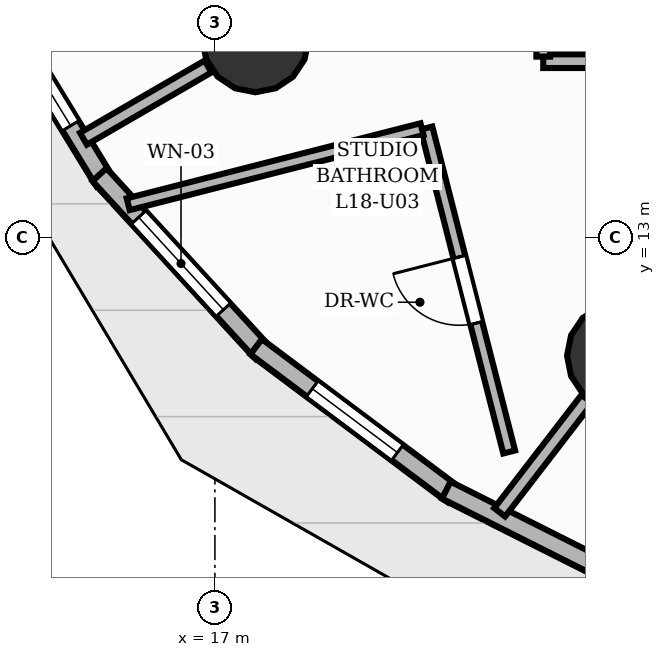
"""IFC4 building model, lengths in metres.
Left out: names, types, materials, properties, quantities, classifications, styles, units other than length and angle.
Written with IfcOpenShell. Run it as: python <this file> out.ifc"""

import sys

from ifc_helpers import new_model, si_unit, direction, frame, frame_2d, origin, origin_2d, place, context, subcontext, project, spatial, rectangle, circle, extrude, element, fill, save


model = new_model("IFC4")
c1 = context("Model", 3, precision=1e-05, world=origin(), true_north=direction((0.0, 1.0)))
c2 = subcontext(c1, "Body", "Model", "MODEL_VIEW")
j1 = project(units=[si_unit("LENGTHUNIT", "METRE"), si_unit("PLANEANGLEUNIT", "RADIAN")], contexts=[c1])
p1 = place(None, origin())
s1 = spatial("IfcSite", under=j1, at=p1, CompositionType="ELEMENT")
p2 = place(p1, origin())
s2 = spatial("IfcBuilding", under=s1, at=p2, CompositionType="ELEMENT")
p3 = place(p2, frame((0.0, 0.0, 63.2)))
s3 = spatial("IfcBuildingStorey", under=s2, at=p3, CompositionType="ELEMENT", Elevation=63.2)
for number, where, z_axis, x_axis in (
    (1, (17.532, 15.611, 0.0), (0.0, 0.0, 1.0), (1.0, 0.0, 0.0)),
    (2, (22.333, 11.445, 0.0), (0.0, 0.0, 1.0), (1.0, 0.0, 0.0)),
):
    element("IfcColumn", number, at=place(p3, frame(where, z_axis=z_axis, x_axis=x_axis)), inside=s3, PredefinedType="COLUMN", context=c2, shape_type="SweptSolid", body=[
        extrude(circle(Radius=0.7, at=origin_2d()), origin(), (0.0, 0.0, 1.0), 3.2),
    ])
p4 = place(p3, frame((15.55, 13.737, 0.0), z_axis=(0.0, 0.0, 1.0), x_axis=(-0.521370891217, 0.853330178648, 0.0)))
e3 = element("IfcWall", 3, at=p4, inside=s3, PredefinedType="SOLIDWALL", context=c2, shape_type="SweptSolid", body=[
    extrude(rectangle(XDim=3.121, YDim=0.25, at=frame_2d((1.56, 0.0))), origin(), (0.0, 0.0, 1.0), 2.8),
])
p5 = place(p4, frame((0.86, 0.0, 0.7)))
e4 = element("IfcOpeningElement", 4, at=p5, cuts=e3, PredefinedType="OPENING", context=c2, shape_type="SweptSolid", body=[
    extrude(rectangle(XDim=1.4, YDim=1.28, at=frame_2d((0.7, 0.64))), frame((0.0, 0.135, 0.0), z_axis=(0.0, -1.0, 0.0), x_axis=(1.0, 0.0, 0.0)), (0.0, 0.0, 1.0), 0.27),
])
p6 = place(p3, frame((17.626, 11.488, 0.0), z_axis=(0.0, 0.0, 1.0), x_axis=(-0.675710696367, 0.737166911096, 0.0)))
e5 = element("IfcWall", 5, at=p6, inside=s3, PredefinedType="SOLIDWALL", context=c2, shape_type="SweptSolid", body=[
    extrude(rectangle(XDim=3.174, YDim=0.25, at=frame_2d((1.587, 0.0))), origin(), (0.0, 0.0, 1.0), 2.8),
])
p7 = place(p6, frame((0.762, 0.0, 0.85)))
e6 = element("IfcOpeningElement", 6, at=p7, cuts=e5, PredefinedType="OPENING", context=c2, shape_type="SweptSolid", body=[
    extrude(rectangle(XDim=1.65, YDim=1.55, at=frame_2d((0.825, 0.775))), frame((0.0, 0.135, 0.0), z_axis=(0.0, -1.0, 0.0), x_axis=(1.0, 0.0, 0.0)), (0.0, 0.0, 1.0), 0.27),
])
p8 = place(p3, frame((20.139, 9.617, 0.0), z_axis=(0.0, 0.0, 1.0), x_axis=(-0.800198613696, 0.599735090385, 0.0)))
e7 = element("IfcWall", 7, at=p8, inside=s3, PredefinedType="SOLIDWALL", context=c2, shape_type="SweptSolid", body=[
    extrude(rectangle(XDim=3.244, YDim=0.25, at=frame_2d((1.622, 0.0))), origin(), (0.0, 0.0, 1.0), 2.8),
])
p9 = place(p8, frame((0.922, 0.0, 0.85)))
e8 = element("IfcOpeningElement", 8, at=p9, cuts=e7, PredefinedType="OPENING", context=c2, shape_type="SweptSolid", body=[
    extrude(rectangle(XDim=1.4, YDim=1.55, at=frame_2d((0.7, 0.775))), frame((0.0, 0.135, 0.0), z_axis=(0.0, -1.0, 0.0), x_axis=(1.0, 0.0, 0.0)), (0.0, 0.0, 1.0), 0.27),
])
p10 = place(p3, frame((23.012, 8.183, 0.0), z_axis=(0.0, 0.0, 1.0), x_axis=(-0.893351919744, 0.449357705498, 0.0)))
e9 = element("IfcWall", 9, at=p10, inside=s3, PredefinedType="SOLIDWALL", context=c2, shape_type="SweptSolid", body=[
    extrude(rectangle(XDim=3.323, YDim=0.25, at=frame_2d((1.662, 0.0))), origin(), (0.0, 0.0, 1.0), 2.8),
])
p11 = place(p3, frame((16.909, 15.25, 0.0), z_axis=(0.0, 0.0, 1.0), x_axis=(-0.865028951922, -0.501721947234, 0.0)))
e10 = element("IfcWall", 10, at=p11, inside=s3, PredefinedType="PARTITIONING", context=c2, shape_type="SweptSolid", body=[
    extrude(rectangle(XDim=1.894, YDim=0.18, at=frame_2d((0.947, 0.0))), origin(), (0.0, 0.0, 1.0), 2.018),
])
p12 = place(p3, frame((21.894, 10.874, 0.0), z_axis=(0.0, 0.0, 1.0), x_axis=(-0.610131095296, -0.792300477441, 0.0)))
e11 = element("IfcWall", 11, at=p12, inside=s3, PredefinedType="PARTITIONING", context=c2, shape_type="SweptSolid", body=[
    extrude(rectangle(XDim=1.88, YDim=0.18, at=frame_2d((0.94, 0.0))), origin(), (0.0, 0.0, 1.0), 2.018),
])
p13 = place(p3, frame((42.62, 15.32, 0.0), z_axis=(0.0, 0.0, 1.0), x_axis=(-1.0, 0.0, 0.0)))
e12 = element("IfcWall", 12, at=p13, inside=s3, PredefinedType="PARTITIONING", context=c2, shape_type="SweptSolid", body=[
    extrude(rectangle(XDim=21.3, YDim=0.18, at=frame_2d((10.65, 0.0))), origin(), (0.0, 0.0, 1.0), 2.795),
])
p14 = place(p13, frame((5.79, 0.0, 0.0)))
e13 = element("IfcOpeningElement", 13, at=p14, cuts=e12, PredefinedType="OPENING", context=c2, shape_type="SweptSolid", body=[
    extrude(rectangle(XDim=1.05, YDim=2.15, at=frame_2d((0.525, 1.075))), frame((0.0, 0.1, 0.0), z_axis=(0.0, -1.0, 0.0), x_axis=(1.0, 0.0, 0.0)), (0.0, 0.0, 1.0), 0.2),
])
p15 = place(p3, frame((21.32, 15.38, 0.0), z_axis=(0.0, 0.0, 1.0), x_axis=(0.0, 1.0, 0.0)))
e14 = element("IfcWall", 14, at=p15, inside=s3, PredefinedType="PARTITIONING", context=c2, shape_type="SweptSolid", body=[
    extrude(rectangle(XDim=17.3, YDim=0.18, at=frame_2d((8.65, 0.0))), origin(), (0.0, 0.0, 1.0), 2.795),
])
p16 = place(p15, frame((8.125, 0.0, 0.0)))
e15 = element("IfcOpeningElement", 15, at=p16, cuts=e14, PredefinedType="OPENING", context=c2, shape_type="SweptSolid", body=[
    extrude(rectangle(XDim=1.05, YDim=2.15, at=frame_2d((0.525, 1.075))), frame((0.0, 0.1, 0.0), z_axis=(0.0, -1.0, 0.0), x_axis=(1.0, 0.0, 0.0)), (0.0, 0.0, 1.0), 0.2),
])
p17 = place(p3, frame((20.872, 10.178, 0.0), z_axis=(0.0, 0.0, 1.0), x_axis=(-0.247520702126, 0.96888260487, 0.0)))
e16 = element("IfcWall", 16, at=p17, inside=s3, PredefinedType="PLUMBINGWALL", context=c2, shape_type="SweptSolid", body=[
    extrude(rectangle(XDim=4.399, YDim=0.16, at=frame_2d((2.2, 0.0))), origin(), (0.0, 0.0, 1.0), 2.795),
])
p18 = place(p17, frame((1.75, 0.0, 0.0)))
e17 = element("IfcOpeningElement", 17, at=p18, cuts=e16, PredefinedType="OPENING", context=c2, shape_type="SweptSolid", body=[
    extrude(rectangle(XDim=0.9, YDim=2.1, at=frame_2d((0.45, 1.05))), frame((0.0, 0.09, 0.0), z_axis=(0.0, -1.0, 0.0), x_axis=(1.0, 0.0, 0.0)), (0.0, 0.0, 1.0), 0.18),
])
p19 = place(p3, frame((19.725, 14.425, 0.0), z_axis=(0.0, 0.0, 1.0), x_axis=(-0.968902730544, -0.24744190984, 0.0)))
e18 = element("IfcWall", 18, at=p19, inside=s3, PredefinedType="PLUMBINGWALL", context=c2, shape_type="SweptSolid", body=[
    extrude(rectangle(XDim=3.99, YDim=0.16, at=frame_2d((1.995, 0.0))), origin(), (0.0, 0.0, 1.0), 2.481),
])
p20 = place(p5, origin())
e19 = element("IfcWindow", 19, at=p20, inside=s3, PartitioningType="SINGLE_PANEL", PredefinedType="WINDOW", context=c2, shape_type="SweptSolid", body=[
    extrude(rectangle(XDim=1.4, YDim=1.28, at=frame_2d((0.7, 0.64))), frame((0.0, 0.03, 0.0), z_axis=(0.0, -1.0, 0.0), x_axis=(1.0, 0.0, 0.0)), (0.0, 0.0, 1.0), 0.06),
])
fill(e4, e19)
p21 = place(p7, origin())
e20 = element("IfcWindow", 20, at=p21, inside=s3, PartitioningType="SINGLE_PANEL", PredefinedType="WINDOW", context=c2, shape_type="SweptSolid", body=[
    extrude(rectangle(XDim=1.65, YDim=1.55, at=frame_2d((0.825, 0.775))), frame((0.0, 0.03, 0.0), z_axis=(0.0, -1.0, 0.0), x_axis=(1.0, 0.0, 0.0)), (0.0, 0.0, 1.0), 0.06),
])
fill(e6, e20)
p22 = place(p9, origin())
e21 = element("IfcWindow", 21, at=p22, inside=s3, PartitioningType="SINGLE_PANEL", PredefinedType="WINDOW", context=c2, shape_type="SweptSolid", body=[
    extrude(rectangle(XDim=1.4, YDim=1.55, at=frame_2d((0.7, 0.775))), frame((0.0, 0.03, 0.0), z_axis=(0.0, -1.0, 0.0), x_axis=(1.0, 0.0, 0.0)), (0.0, 0.0, 1.0), 0.06),
])
fill(e8, e21)
p23 = place(p18, origin())
e22 = element("IfcDoor", 22, at=p23, inside=s3, OperationType="SINGLE_SWING_RIGHT", PredefinedType="DOOR", context=c2, shape_type="SweptSolid", body=[
    extrude(rectangle(XDim=0.9, YDim=2.1, at=frame_2d((0.45, 1.05))), frame((0.0, 0.025, 0.0), z_axis=(0.0, -1.0, 0.0), x_axis=(1.0, 0.0, 0.0)), (0.0, 0.0, 1.0), 0.05),
])
fill(e17, e22)
save(model, sys.argv[1])
